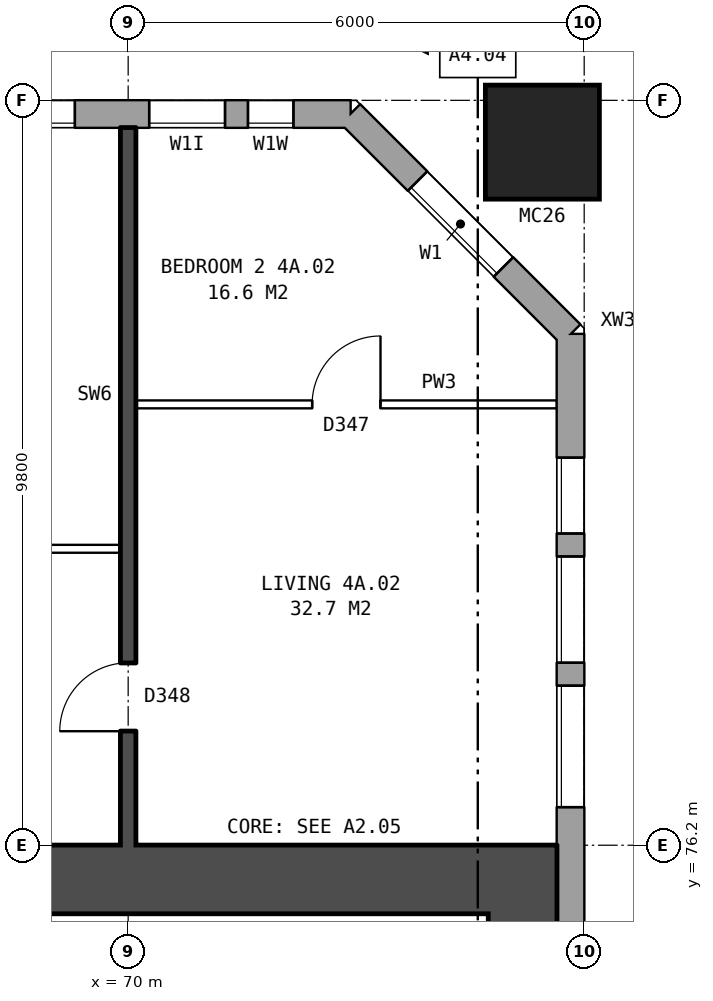
"""IFC4 building model, lengths in metres.
Left out: names, types, materials, properties, quantities, classifications, styles, units other than length and angle.
Written with IfcOpenShell. Run it as: python <this file> out.ifc"""

import sys

from ifc_helpers import new_model, si_unit, direction, frame, frame_2d, origin, origin_2d, place, context, subcontext, project, spatial, rectangle, hollow_rectangle, extrude, element, fill, save


model = new_model("IFC4")
c1 = context("Model", 3, precision=1e-05, world=origin(), true_north=direction((0.0, 1.0)))
c2 = subcontext(c1, "Body", "Model", "MODEL_VIEW")
j1 = project(units=[si_unit("LENGTHUNIT", "METRE"), si_unit("PLANEANGLEUNIT", "RADIAN")], contexts=[c1])
p1 = place(None, origin())
s1 = spatial("IfcSite", under=j1, at=p1, CompositionType="ELEMENT")
p2 = place(p1, origin())
s2 = spatial("IfcBuilding", under=s1, at=p2, CompositionType="ELEMENT")
p3 = place(p2, frame((0.0, 0.0, 19.5)))
s3 = spatial("IfcBuildingStorey", under=s2, at=p3, CompositionType="ELEMENT", Elevation=19.5)
p4 = place(p3, frame((75.45, 85.45, 0.0), z_axis=(0.0, 0.0, 1.0), x_axis=(1.0, 0.0, 0.0)))
e1 = element("IfcColumn", 1, at=p4, inside=s3, PredefinedType="COLUMN", context=c2, shape_type="SweptSolid", body=[
    extrude(hollow_rectangle(XDim=1.5, YDim=1.5, WallThickness=0.08, at=origin_2d()), origin(), (0.0, 0.0, 1.0), 3.1),
])
p5 = place(p3, frame((75.82, 57.075, 0.0), z_axis=(0.0, 0.0, 1.0), x_axis=(0.0, 1.0, 0.0)))
e2 = element("IfcWall", 2, at=p5, inside=s3, PredefinedType="STANDARD", context=c2, shape_type="SweptSolid", body=[
    extrude(rectangle(XDim=25.851, YDim=0.36, at=frame_2d((12.925, 0.0))), origin(), (0.0, 0.0, 1.0), 2.85),
])
p6 = place(p5, frame((1.475, 0.0, 0.8)))
e3 = element("IfcOpeningElement", 3, at=p6, cuts=e2, PredefinedType="OPENING", context=c2, shape_type="SweptSolid", body=[
    extrude(rectangle(XDim=1.0, YDim=1.2, at=frame_2d((0.5, 0.6))), frame((0.0, 0.19, 0.0), z_axis=(0.0, -1.0, 0.0), x_axis=(1.0, 0.0, 0.0)), (0.0, 0.0, 1.0), 0.38),
])
p7 = place(p5, frame((4.625, 0.0, 0.8)))
e4 = element("IfcOpeningElement", 4, at=p7, cuts=e2, PredefinedType="OPENING", context=c2, shape_type="SweptSolid", body=[
    extrude(rectangle(XDim=1.6, YDim=1.8, at=frame_2d((0.8, 0.9))), frame((0.0, 0.19, 0.0), z_axis=(0.0, -1.0, 0.0), x_axis=(1.0, 0.0, 0.0)), (0.0, 0.0, 1.0), 0.38),
])
p8 = place(p5, frame((19.625, 0.0, 0.8)))
e5 = element("IfcOpeningElement", 5, at=p8, cuts=e2, PredefinedType="OPENING", context=c2, shape_type="SweptSolid", body=[
    extrude(rectangle(XDim=1.6, YDim=1.8, at=frame_2d((0.8, 0.9))), frame((0.0, 0.19, 0.0), z_axis=(0.0, -1.0, 0.0), x_axis=(1.0, 0.0, 0.0)), (0.0, 0.0, 1.0), 0.38),
])
p9 = place(p5, frame((21.525, 0.0, 0.8)))
e6 = element("IfcOpeningElement", 6, at=p9, cuts=e2, PredefinedType="OPENING", context=c2, shape_type="SweptSolid", body=[
    extrude(rectangle(XDim=1.4, YDim=1.8, at=frame_2d((0.7, 0.9))), frame((0.0, 0.19, 0.0), z_axis=(0.0, -1.0, 0.0), x_axis=(1.0, 0.0, 0.0)), (0.0, 0.0, 1.0), 0.38),
])
p10 = place(p5, frame((2.775, 0.0, 0.8)))
e7 = element("IfcOpeningElement", 7, at=p10, cuts=e2, PredefinedType="OPENING", context=c2, shape_type="SweptSolid", body=[
    extrude(rectangle(XDim=1.4, YDim=1.8, at=frame_2d((0.7, 0.9))), frame((0.0, 0.19, 0.0), z_axis=(0.0, -1.0, 0.0), x_axis=(1.0, 0.0, 0.0)), (0.0, 0.0, 1.0), 0.38),
])
p11 = place(p5, frame((23.225, 0.0, 0.8)))
e8 = element("IfcOpeningElement", 8, at=p11, cuts=e2, PredefinedType="OPENING", context=c2, shape_type="SweptSolid", body=[
    extrude(rectangle(XDim=1.0, YDim=1.2, at=frame_2d((0.5, 0.6))), frame((0.0, 0.19, 0.0), z_axis=(0.0, -1.0, 0.0), x_axis=(1.0, 0.0, 0.0)), (0.0, 0.0, 1.0), 0.38),
])
p12 = place(p3, frame((75.82, 82.925, 0.0), z_axis=(0.0, 0.0, 1.0), x_axis=(-0.707106781187, 0.707106781187, 0.0)))
e9 = element("IfcWall", 9, at=p12, inside=s3, PredefinedType="STANDARD", context=c2, shape_type="SweptSolid", body=[
    extrude(rectangle(XDim=4.094, YDim=0.36, at=frame_2d((2.047, 0.0))), origin(), (0.0, 0.0, 1.0), 2.85),
])
p13 = place(p12, frame((1.247, 0.0, 0.8)))
e10 = element("IfcOpeningElement", 10, at=p13, cuts=e9, PredefinedType="OPENING", context=c2, shape_type="SweptSolid", body=[
    extrude(rectangle(XDim=1.6, YDim=1.8, at=frame_2d((0.8, 0.9))), frame((0.0, 0.19, 0.0), z_axis=(0.0, -1.0, 0.0), x_axis=(1.0, 0.0, 0.0)), (0.0, 0.0, 1.0), 0.38),
])
p14 = place(p3, frame((72.925, 85.82, 0.0), z_axis=(0.0, 0.0, 1.0), x_axis=(-1.0, 0.0, 0.0)))
e11 = element("IfcWall", 11, at=p14, inside=s3, PredefinedType="STANDARD", context=c2, shape_type="SweptSolid", body=[
    extrude(rectangle(XDim=50.101, YDim=0.36, at=frame_2d((25.05, 0.0))), origin(), (0.0, 0.0, 1.0), 2.85),
])
p15 = place(p14, frame((0.75, 0.0, 0.8)))
e12 = element("IfcOpeningElement", 12, at=p15, cuts=e11, PredefinedType="OPENING", context=c2, shape_type="SweptSolid", body=[
    extrude(rectangle(XDim=0.6, YDim=0.9, at=frame_2d((0.3, 0.45))), frame((0.0, 0.19, 0.0), z_axis=(0.0, -1.0, 0.0), x_axis=(1.0, 0.0, 0.0)), (0.0, 0.0, 1.0), 0.38),
])
p16 = place(p14, frame((3.625, 0.0, 0.8)))
e13 = element("IfcOpeningElement", 13, at=p16, cuts=e11, PredefinedType="OPENING", context=c2, shape_type="SweptSolid", body=[
    extrude(rectangle(XDim=1.6, YDim=1.8, at=frame_2d((0.8, 0.9))), frame((0.0, 0.19, 0.0), z_axis=(0.0, -1.0, 0.0), x_axis=(1.0, 0.0, 0.0)), (0.0, 0.0, 1.0), 0.38),
])
p17 = place(p14, frame((6.625, 0.0, 0.8)))
e14 = element("IfcOpeningElement", 14, at=p17, cuts=e11, PredefinedType="OPENING", context=c2, shape_type="SweptSolid", body=[
    extrude(rectangle(XDim=1.6, YDim=1.8, at=frame_2d((0.8, 0.9))), frame((0.0, 0.19, 0.0), z_axis=(0.0, -1.0, 0.0), x_axis=(1.0, 0.0, 0.0)), (0.0, 0.0, 1.0), 0.38),
])
p18 = place(p14, frame((9.625, 0.0, 0.8)))
e15 = element("IfcOpeningElement", 15, at=p18, cuts=e11, PredefinedType="OPENING", context=c2, shape_type="SweptSolid", body=[
    extrude(rectangle(XDim=1.6, YDim=1.8, at=frame_2d((0.8, 0.9))), frame((0.0, 0.19, 0.0), z_axis=(0.0, -1.0, 0.0), x_axis=(1.0, 0.0, 0.0)), (0.0, 0.0, 1.0), 0.38),
])
p19 = place(p14, frame((12.625, 0.0, 0.8)))
e16 = element("IfcOpeningElement", 16, at=p19, cuts=e11, PredefinedType="OPENING", context=c2, shape_type="SweptSolid", body=[
    extrude(rectangle(XDim=1.6, YDim=1.8, at=frame_2d((0.8, 0.9))), frame((0.0, 0.19, 0.0), z_axis=(0.0, -1.0, 0.0), x_axis=(1.0, 0.0, 0.0)), (0.0, 0.0, 1.0), 0.38),
])
p20 = place(p14, frame((15.625, 0.0, 0.8)))
e17 = element("IfcOpeningElement", 17, at=p20, cuts=e11, PredefinedType="OPENING", context=c2, shape_type="SweptSolid", body=[
    extrude(rectangle(XDim=1.6, YDim=1.8, at=frame_2d((0.8, 0.9))), frame((0.0, 0.19, 0.0), z_axis=(0.0, -1.0, 0.0), x_axis=(1.0, 0.0, 0.0)), (0.0, 0.0, 1.0), 0.38),
])
p21 = place(p14, frame((18.625, 0.0, 0.8)))
e18 = element("IfcOpeningElement", 18, at=p21, cuts=e11, PredefinedType="OPENING", context=c2, shape_type="SweptSolid", body=[
    extrude(rectangle(XDim=1.6, YDim=1.8, at=frame_2d((0.8, 0.9))), frame((0.0, 0.19, 0.0), z_axis=(0.0, -1.0, 0.0), x_axis=(1.0, 0.0, 0.0)), (0.0, 0.0, 1.0), 0.38),
])
p22 = place(p14, frame((21.625, 0.0, 0.8)))
e19 = element("IfcOpeningElement", 19, at=p22, cuts=e11, PredefinedType="OPENING", context=c2, shape_type="SweptSolid", body=[
    extrude(rectangle(XDim=1.6, YDim=1.8, at=frame_2d((0.8, 0.9))), frame((0.0, 0.19, 0.0), z_axis=(0.0, -1.0, 0.0), x_axis=(1.0, 0.0, 0.0)), (0.0, 0.0, 1.0), 0.38),
])
p23 = place(p14, frame((24.625, 0.0, 0.8)))
e20 = element("IfcOpeningElement", 20, at=p23, cuts=e11, PredefinedType="OPENING", context=c2, shape_type="SweptSolid", body=[
    extrude(rectangle(XDim=1.6, YDim=1.8, at=frame_2d((0.8, 0.9))), frame((0.0, 0.19, 0.0), z_axis=(0.0, -1.0, 0.0), x_axis=(1.0, 0.0, 0.0)), (0.0, 0.0, 1.0), 0.38),
])
p24 = place(p14, frame((27.625, 0.0, 0.8)))
e21 = element("IfcOpeningElement", 21, at=p24, cuts=e11, PredefinedType="OPENING", context=c2, shape_type="SweptSolid", body=[
    extrude(rectangle(XDim=1.6, YDim=1.8, at=frame_2d((0.8, 0.9))), frame((0.0, 0.19, 0.0), z_axis=(0.0, -1.0, 0.0), x_axis=(1.0, 0.0, 0.0)), (0.0, 0.0, 1.0), 0.38),
])
p25 = place(p14, frame((30.625, 0.0, 0.8)))
e22 = element("IfcOpeningElement", 22, at=p25, cuts=e11, PredefinedType="OPENING", context=c2, shape_type="SweptSolid", body=[
    extrude(rectangle(XDim=1.6, YDim=1.8, at=frame_2d((0.8, 0.9))), frame((0.0, 0.19, 0.0), z_axis=(0.0, -1.0, 0.0), x_axis=(1.0, 0.0, 0.0)), (0.0, 0.0, 1.0), 0.38),
])
p26 = place(p14, frame((33.625, 0.0, 0.8)))
e23 = element("IfcOpeningElement", 23, at=p26, cuts=e11, PredefinedType="OPENING", context=c2, shape_type="SweptSolid", body=[
    extrude(rectangle(XDim=1.6, YDim=1.8, at=frame_2d((0.8, 0.9))), frame((0.0, 0.19, 0.0), z_axis=(0.0, -1.0, 0.0), x_axis=(1.0, 0.0, 0.0)), (0.0, 0.0, 1.0), 0.38),
])
p27 = place(p14, frame((36.625, 0.0, 0.8)))
e24 = element("IfcOpeningElement", 24, at=p27, cuts=e11, PredefinedType="OPENING", context=c2, shape_type="SweptSolid", body=[
    extrude(rectangle(XDim=1.6, YDim=1.8, at=frame_2d((0.8, 0.9))), frame((0.0, 0.19, 0.0), z_axis=(0.0, -1.0, 0.0), x_axis=(1.0, 0.0, 0.0)), (0.0, 0.0, 1.0), 0.38),
])
p28 = place(p14, frame((39.625, 0.0, 0.8)))
e25 = element("IfcOpeningElement", 25, at=p28, cuts=e11, PredefinedType="OPENING", context=c2, shape_type="SweptSolid", body=[
    extrude(rectangle(XDim=1.6, YDim=1.8, at=frame_2d((0.8, 0.9))), frame((0.0, 0.19, 0.0), z_axis=(0.0, -1.0, 0.0), x_axis=(1.0, 0.0, 0.0)), (0.0, 0.0, 1.0), 0.38),
])
p29 = place(p14, frame((42.625, 0.0, 0.8)))
e26 = element("IfcOpeningElement", 26, at=p29, cuts=e11, PredefinedType="OPENING", context=c2, shape_type="SweptSolid", body=[
    extrude(rectangle(XDim=1.6, YDim=1.8, at=frame_2d((0.8, 0.9))), frame((0.0, 0.19, 0.0), z_axis=(0.0, -1.0, 0.0), x_axis=(1.0, 0.0, 0.0)), (0.0, 0.0, 1.0), 0.38),
])
p30 = place(p14, frame((45.625, 0.0, 0.8)))
e27 = element("IfcOpeningElement", 27, at=p30, cuts=e11, PredefinedType="OPENING", context=c2, shape_type="SweptSolid", body=[
    extrude(rectangle(XDim=1.6, YDim=1.8, at=frame_2d((0.8, 0.9))), frame((0.0, 0.19, 0.0), z_axis=(0.0, -1.0, 0.0), x_axis=(1.0, 0.0, 0.0)), (0.0, 0.0, 1.0), 0.38),
])
p31 = place(p14, frame((1.65, 0.0, 0.8)))
e28 = element("IfcOpeningElement", 28, at=p31, cuts=e11, PredefinedType="OPENING", context=c2, shape_type="SweptSolid", body=[
    extrude(rectangle(XDim=1.0, YDim=1.5, at=frame_2d((0.5, 0.75))), frame((0.0, 0.19, 0.0), z_axis=(0.0, -1.0, 0.0), x_axis=(1.0, 0.0, 0.0)), (0.0, 0.0, 1.0), 0.38),
])
p32 = place(p3, frame((75.19, 64.7, 0.0), z_axis=(0.0, 0.0, 1.0), x_axis=(0.0, 1.0, 0.0)))
e29 = element("IfcWall", 29, at=p32, inside=s3, PredefinedType="SHEAR", context=c2, shape_type="SweptSolid", body=[
    extrude(rectangle(XDim=10.6, YDim=0.9, at=frame_2d((5.3, 0.0))), origin(), (0.0, 0.0, 1.0), 2.85),
])
p33 = place(p3, frame((66.64, 75.75, 0.0), z_axis=(0.0, 0.0, 1.0), x_axis=(1.0, 0.0, 0.0)))
e30 = element("IfcWall", 30, at=p33, inside=s3, PredefinedType="SHEAR", context=c2, shape_type="SweptSolid", body=[
    extrude(rectangle(XDim=9.0, YDim=0.9, at=frame_2d((4.5, 0.0))), origin(), (0.0, 0.0, 1.0), 2.85),
])
p34 = place(p3, frame((64.1, 80.1, 0.0), z_axis=(0.0, 0.0, 1.0), x_axis=(1.0, 0.0, 0.0)))
e31 = element("IfcWall", 31, at=p34, inside=s3, PredefinedType="PARTITIONING", context=c2, shape_type="SweptSolid", body=[
    extrude(rectangle(XDim=5.8, YDim=0.1, at=frame_2d((2.9, 0.0))), origin(), (0.0, 0.0, 1.0), 2.85),
])
p35 = place(p34, frame((3.6, 0.0, 0.0)))
e32 = element("IfcOpeningElement", 32, at=p35, cuts=e31, PredefinedType="OPENING", context=c2, shape_type="SweptSolid", body=[
    extrude(rectangle(XDim=0.9, YDim=2.1, at=frame_2d((0.45, 1.05))), frame((0.0, 0.06, 0.0), z_axis=(0.0, -1.0, 0.0), x_axis=(1.0, 0.0, 0.0)), (0.0, 0.0, 1.0), 0.12),
])
p36 = place(p34, frame((0.7, 0.0, 0.0)))
e33 = element("IfcOpeningElement", 33, at=p36, cuts=e31, PredefinedType="OPENING", context=c2, shape_type="SweptSolid", body=[
    extrude(rectangle(XDim=0.9, YDim=2.1, at=frame_2d((0.45, 1.05))), frame((0.0, 0.06, 0.0), z_axis=(0.0, -1.0, 0.0), x_axis=(1.0, 0.0, 0.0)), (0.0, 0.0, 1.0), 0.12),
])
p37 = place(p3, frame((70.1, 82.0, 0.0), z_axis=(0.0, 0.0, 1.0), x_axis=(1.0, 0.0, 0.0)))
e34 = element("IfcWall", 34, at=p37, inside=s3, PredefinedType="PARTITIONING", context=c2, shape_type="SweptSolid", body=[
    extrude(rectangle(XDim=5.54, YDim=0.1, at=frame_2d((2.77, 0.0))), origin(), (0.0, 0.0, 1.0), 2.85),
])
p38 = place(p37, frame((2.32, 0.0, 0.0)))
e35 = element("IfcOpeningElement", 35, at=p38, cuts=e34, PredefinedType="OPENING", context=c2, shape_type="SweptSolid", body=[
    extrude(rectangle(XDim=0.9, YDim=2.1, at=frame_2d((0.45, 1.05))), frame((0.0, 0.06, 0.0), z_axis=(0.0, -1.0, 0.0), x_axis=(1.0, 0.0, 0.0)), (0.0, 0.0, 1.0), 0.12),
])
p39 = place(p3, frame((70.0, 76.2, 0.0), z_axis=(0.0, 0.0, 1.0), x_axis=(0.0, 1.0, 0.0)))
e36 = element("IfcWall", 36, at=p39, inside=s3, PredefinedType="SOLIDWALL", context=c2, shape_type="SweptSolid", body=[
    extrude(rectangle(XDim=9.44, YDim=0.2, at=frame_2d((4.72, 0.0))), origin(), (0.0, 0.0, 1.0), 2.85),
])
p40 = place(p39, frame((1.5, 0.0, 0.0)))
e37 = element("IfcOpeningElement", 37, at=p40, cuts=e36, PredefinedType="OPENING", context=c2, shape_type="SweptSolid", body=[
    extrude(rectangle(XDim=0.9, YDim=2.1, at=frame_2d((0.45, 1.05))), frame((0.0, 0.11, 0.0), z_axis=(0.0, -1.0, 0.0), x_axis=(1.0, 0.0, 0.0)), (0.0, 0.0, 1.0), 0.22),
])
p41 = place(p8, origin())
e38 = element("IfcWindow", 38, at=p41, inside=s3, PartitioningType="SINGLE_PANEL", PredefinedType="WINDOW", context=c2, shape_type="SweptSolid", body=[
    extrude(rectangle(XDim=1.6, YDim=1.8, at=frame_2d((0.8, 0.9))), frame((0.0, 0.15, 0.0), z_axis=(0.0, -1.0, 0.0), x_axis=(1.0, 0.0, 0.0)), (0.0, 0.0, 1.0), 0.06),
])
fill(e5, e38)
p42 = place(p9, origin())
e39 = element("IfcWindow", 39, at=p42, inside=s3, PartitioningType="SINGLE_PANEL", PredefinedType="WINDOW", context=c2, shape_type="SweptSolid", body=[
    extrude(rectangle(XDim=1.4, YDim=1.8, at=frame_2d((0.7, 0.9))), frame((0.0, 0.15, 0.0), z_axis=(0.0, -1.0, 0.0), x_axis=(1.0, 0.0, 0.0)), (0.0, 0.0, 1.0), 0.06),
])
fill(e6, e39)
p43 = place(p13, origin())
e40 = element("IfcWindow", 40, at=p43, inside=s3, PartitioningType="SINGLE_PANEL", PredefinedType="WINDOW", context=c2, shape_type="SweptSolid", body=[
    extrude(rectangle(XDim=1.6, YDim=1.8, at=frame_2d((0.8, 0.9))), frame((0.0, 0.15, 0.0), z_axis=(0.0, -1.0, 0.0), x_axis=(1.0, 0.0, 0.0)), (0.0, 0.0, 1.0), 0.06),
])
fill(e10, e40)
p44 = place(p15, origin())
e41 = element("IfcWindow", 41, at=p44, inside=s3, PartitioningType="SINGLE_PANEL", PredefinedType="WINDOW", context=c2, shape_type="SweptSolid", body=[
    extrude(rectangle(XDim=0.6, YDim=0.9, at=frame_2d((0.3, 0.45))), frame((0.0, 0.15, 0.0), z_axis=(0.0, -1.0, 0.0), x_axis=(1.0, 0.0, 0.0)), (0.0, 0.0, 1.0), 0.06),
])
fill(e12, e41)
p45 = place(p16, origin())
e42 = element("IfcWindow", 42, at=p45, inside=s3, PartitioningType="SINGLE_PANEL", PredefinedType="WINDOW", context=c2, shape_type="SweptSolid", body=[
    extrude(rectangle(XDim=1.6, YDim=1.8, at=frame_2d((0.8, 0.9))), frame((0.0, 0.15, 0.0), z_axis=(0.0, -1.0, 0.0), x_axis=(1.0, 0.0, 0.0)), (0.0, 0.0, 1.0), 0.06),
])
fill(e13, e42)
p46 = place(p38, origin())
e43 = element("IfcDoor", 43, at=p46, inside=s3, OperationType="SINGLE_SWING_RIGHT", PredefinedType="DOOR", context=c2, shape_type="SweptSolid", body=[
    extrude(rectangle(XDim=0.9, YDim=2.1, at=frame_2d((0.45, 1.05))), frame((0.0, 0.025, 0.0), z_axis=(0.0, -1.0, 0.0), x_axis=(1.0, 0.0, 0.0)), (0.0, 0.0, 1.0), 0.05),
])
fill(e35, e43)
p47 = place(p40, origin())
e44 = element("IfcDoor", 44, at=p47, inside=s3, OperationType="SINGLE_SWING_LEFT", PredefinedType="DOOR", context=c2, shape_type="SweptSolid", body=[
    extrude(rectangle(XDim=0.9, YDim=2.1, at=frame_2d((0.45, 1.05))), frame((0.0, 0.025, 0.0), z_axis=(0.0, -1.0, 0.0), x_axis=(1.0, 0.0, 0.0)), (0.0, 0.0, 1.0), 0.05),
])
fill(e37, e44)
p48 = place(p11, origin())
e45 = element("IfcWindow", 45, at=p48, inside=s3, PartitioningType="SINGLE_PANEL", PredefinedType="WINDOW", context=c2, shape_type="SweptSolid", body=[
    extrude(rectangle(XDim=1.0, YDim=1.2, at=frame_2d((0.5, 0.6))), frame((0.0, 0.15, 0.0), z_axis=(0.0, -1.0, 0.0), x_axis=(1.0, 0.0, 0.0)), (0.0, 0.0, 1.0), 0.06),
])
fill(e8, e45)
p49 = place(p31, origin())
e46 = element("IfcWindow", 46, at=p49, inside=s3, PartitioningType="SINGLE_PANEL", PredefinedType="WINDOW", context=c2, shape_type="SweptSolid", body=[
    extrude(rectangle(XDim=1.0, YDim=1.5, at=frame_2d((0.5, 0.75))), frame((0.0, 0.15, 0.0), z_axis=(0.0, -1.0, 0.0), x_axis=(1.0, 0.0, 0.0)), (0.0, 0.0, 1.0), 0.06),
])
fill(e28, e46)
save(model, sys.argv[1])
